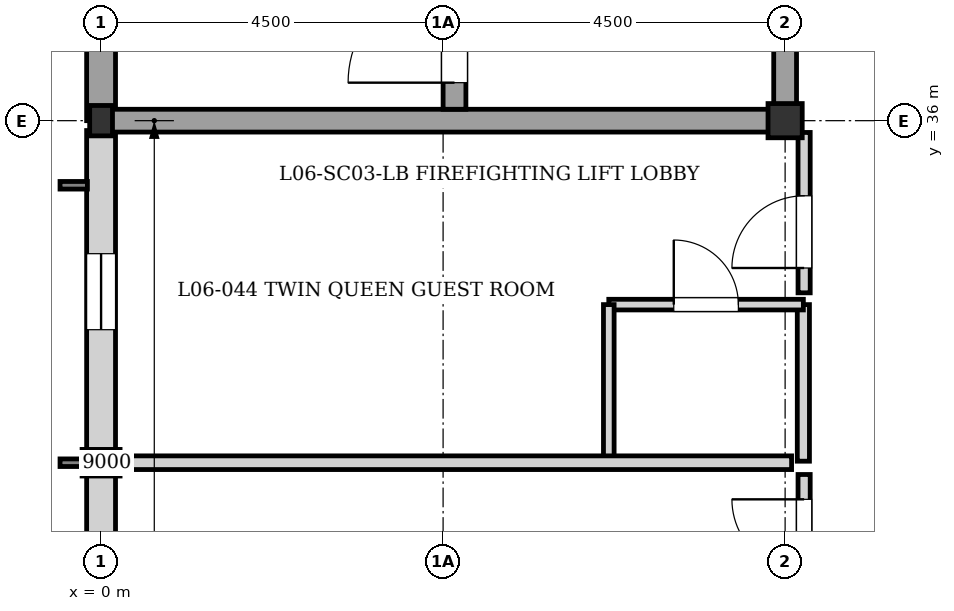
"""IFC4 building model, lengths in metres.
Left out: names, types, materials, properties, quantities, classifications, styles, units other than length and angle.
Written with IfcOpenShell. Run it as: python <this file> out.ifc"""

import sys

from ifc_helpers import new_model, si_unit, direction, frame, frame_2d, origin, origin_2d, place, context, subcontext, project, spatial, rectangle, i_section, extrude, element, fill, save


model = new_model("IFC4")
c1 = context("Model", 3, precision=1e-05, world=origin(), true_north=direction((0.0, 1.0)))
c2 = subcontext(c1, "Body", "Model", "MODEL_VIEW")
j1 = project(units=[si_unit("LENGTHUNIT", "METRE"), si_unit("PLANEANGLEUNIT", "RADIAN")], contexts=[c1])
p1 = place(None, origin())
s1 = spatial("IfcSite", under=j1, at=p1, CompositionType="ELEMENT")
p2 = place(p1, origin())
s2 = spatial("IfcBuilding", under=s1, at=p2, CompositionType="ELEMENT")
p3 = place(p2, frame((0.0, 0.0, 20.64)))
s3 = spatial("IfcBuildingStorey", under=s2, at=p3, CompositionType="ELEMENT", Elevation=20.64)
p4 = place(p3, frame((0.0, 36.0, 0.0), z_axis=(0.0, 0.0, 1.0), x_axis=(1.0, 0.0, 0.0)))
e1 = element("IfcColumn", 1, at=p4, inside=s3, PredefinedType="COLUMN", context=c2, shape_type="SweptSolid", body=[
    extrude(i_section(OverallWidth=0.3, OverallDepth=0.4, WebThickness=0.013, FlangeThickness=0.024, at=origin_2d()), origin(), (0.0, 0.0, 1.0), 3.04),
])
p5 = place(p3, frame((9.0, 36.0, 0.0), z_axis=(0.0, 0.0, 1.0), x_axis=(1.0, 0.0, 0.0)))
e2 = element("IfcColumn", 2, at=p5, inside=s3, PredefinedType="COLUMN", context=c2, shape_type="SweptSolid", body=[
    extrude(rectangle(XDim=0.45, YDim=0.45, at=origin_2d()), origin(), (0.0, 0.0, 1.0), 3.04),
])
p6 = place(p3, frame((0.0, 31.5, 0.0), z_axis=(0.0, 0.0, 1.0), x_axis=(0.0, 1.0, 0.0)))
e3 = element("IfcColumn", 3, at=p6, inside=s3, PredefinedType="PILASTER", context=c2, shape_type="SweptSolid", body=[
    extrude(rectangle(XDim=0.35, YDim=0.5, at=origin_2d()), origin(), (0.0, 0.0, 1.0), 3.04),
])
p7 = place(p3, frame((0.0, 27.0, 0.0), z_axis=(0.0, 0.0, 1.0), x_axis=(0.0, 1.0, 0.0)))
e4 = element("IfcWall", 4, at=p7, inside=s3, PredefinedType="SOLIDWALL", context=c2, shape_type="SweptSolid", body=[
    extrude(rectangle(XDim=8.87, YDim=0.38, at=frame_2d((4.435, 0.0))), origin(), (0.0, 0.0, 1.0), 2.82),
])
p8 = place(p7, frame((1.75, 0.0, 0.35)))
e5 = element("IfcOpeningElement", 5, at=p8, cuts=e4, PredefinedType="OPENING", context=c2, shape_type="SweptSolid", body=[
    extrude(rectangle(XDim=1.0, YDim=1.6, at=frame_2d((0.5, 0.8))), frame((0.0, 0.2, 0.0), z_axis=(0.0, -1.0, 0.0), x_axis=(1.0, 0.0, 0.0)), (0.0, 0.0, 1.0), 0.4),
])
p9 = place(p7, frame((6.25, 0.0, 0.35)))
e6 = element("IfcOpeningElement", 6, at=p9, cuts=e4, PredefinedType="OPENING", context=c2, shape_type="SweptSolid", body=[
    extrude(rectangle(XDim=1.0, YDim=1.6, at=frame_2d((0.5, 0.8))), frame((0.0, 0.2, 0.0), z_axis=(0.0, -1.0, 0.0), x_axis=(1.0, 0.0, 0.0)), (0.0, 0.0, 1.0), 0.4),
])
p10 = place(p3, frame((0.0, 36.0, 0.0), z_axis=(0.0, 0.0, 1.0), x_axis=(0.0, 1.0, 0.0)))
e7 = element("IfcWall", 7, at=p10, inside=s3, PredefinedType="SOLIDWALL", context=c2, shape_type="SweptSolid", body=[
    extrude(rectangle(XDim=9.0, YDim=0.38, at=frame_2d((4.5, 0.0))), origin(), (0.0, 0.0, 1.0), 2.82),
])
p11 = place(p3, frame((0.0, 36.0, 0.0), z_axis=(0.0, 0.0, 1.0), x_axis=(1.0, 0.0, 0.0)))
e8 = element("IfcWall", 8, at=p11, inside=s3, PredefinedType="SHEAR", context=c2, shape_type="SweptSolid", body=[
    extrude(rectangle(XDim=9.0, YDim=0.3, at=frame_2d((4.5, 0.0))), origin(), (0.0, 0.0, 1.0), 2.82),
])
p12 = place(p3, frame((9.0, 36.0, 0.0), z_axis=(0.0, 0.0, 1.0), x_axis=(0.0, 1.0, 0.0)))
e9 = element("IfcWall", 9, at=p12, inside=s3, PredefinedType="SHEAR", context=c2, shape_type="SweptSolid", body=[
    extrude(rectangle(XDim=9.0, YDim=0.3, at=frame_2d((4.5, 0.0))), origin(), (0.0, 0.0, 1.0), 2.82),
])
p13 = place(p12, frame((2.05, 0.0, 0.0)))
e10 = element("IfcOpeningElement", 10, at=p13, cuts=e9, PredefinedType="OPENING", context=c2, shape_type="SweptSolid", body=[
    extrude(rectangle(XDim=1.4, YDim=2.02, at=frame_2d((0.7, 1.01))), frame((0.0, 0.16, 0.0), z_axis=(0.0, -1.0, 0.0), x_axis=(1.0, 0.0, 0.0)), (0.0, 0.0, 1.0), 0.32),
])
p14 = place(p3, frame((4.65, 36.15, 0.0), z_axis=(0.0, 0.0, 1.0), x_axis=(0.0, 1.0, 0.0)))
e11 = element("IfcWall", 11, at=p14, inside=s3, PredefinedType="SHEAR", context=c2, shape_type="SweptSolid", body=[
    extrude(rectangle(XDim=8.7, YDim=0.3, at=frame_2d((4.35, 0.0))), origin(), (0.0, 0.0, 1.0), 2.82),
])
p15 = place(p14, frame((0.35, 0.0, 0.0)))
e12 = element("IfcOpeningElement", 12, at=p15, cuts=e11, PredefinedType="OPENING", context=c2, shape_type="SweptSolid", body=[
    extrude(rectangle(XDim=1.4, YDim=2.02, at=frame_2d((0.7, 1.01))), frame((0.0, 0.16, 0.0), z_axis=(0.0, -1.0, 0.0), x_axis=(1.0, 0.0, 0.0)), (0.0, 0.0, 1.0), 0.32),
])
p16 = place(p3, frame((9.24, 31.52, 0.0), z_axis=(0.0, 0.0, 1.0), x_axis=(0.0, 1.0, 0.0)))
e13 = element("IfcWall", 13, at=p16, inside=s3, PredefinedType="PARTITIONING", context=c2, shape_type="SweptSolid", body=[
    extrude(rectangle(XDim=2.06, YDim=0.16, at=frame_2d((1.03, 0.0))), origin(), (0.0, 0.0, 1.0), 2.82),
])
p17 = place(p3, frame((6.68, 33.58, 0.0), z_axis=(0.0, 0.0, 1.0), x_axis=(1.0, 0.0, 0.0)))
e14 = element("IfcWall", 14, at=p17, inside=s3, PredefinedType="PLUMBINGWALL", context=c2, shape_type="SweptSolid", body=[
    extrude(rectangle(XDim=2.56, YDim=0.14, at=frame_2d((1.28, 0.0))), origin(), (0.0, 0.0, 1.0), 2.82),
])
p18 = place(p17, frame((0.855, 0.0, 0.0)))
e15 = element("IfcOpeningElement", 15, at=p18, cuts=e14, PredefinedType="OPENING", context=c2, shape_type="SweptSolid", body=[
    extrude(rectangle(XDim=0.85, YDim=2.04, at=frame_2d((0.425, 1.02))), frame((0.0, 0.08, 0.0), z_axis=(0.0, -1.0, 0.0), x_axis=(1.0, 0.0, 0.0)), (0.0, 0.0, 1.0), 0.16),
])
p19 = place(p3, frame((6.68, 31.52, 0.0), z_axis=(0.0, 0.0, 1.0), x_axis=(0.0, 1.0, 0.0)))
e16 = element("IfcWall", 16, at=p19, inside=s3, PredefinedType="PLUMBINGWALL", context=c2, shape_type="SweptSolid", body=[
    extrude(rectangle(XDim=2.06, YDim=0.14, at=frame_2d((1.03, 0.0))), origin(), (0.0, 0.0, 1.0), 2.82),
])
p20 = place(p3, frame((0.195, 31.5, 0.0), z_axis=(0.0, 0.0, 1.0), x_axis=(1.0, 0.0, 0.0)))
e17 = element("IfcWall", 17, at=p20, inside=s3, PredefinedType="PARTITIONING", context=c2, shape_type="SweptSolid", body=[
    extrude(rectangle(XDim=8.89, YDim=0.18, at=frame_2d((4.445, 0.0))), origin(), (0.0, 0.0, 1.0), 2.82),
])
p21 = place(p3, frame((9.25, 29.235, 0.0), z_axis=(0.0, 0.0, 1.0), x_axis=(0.0, 1.0, 0.0)))
e18 = element("IfcWall", 18, at=p21, inside=s3, PredefinedType="PARTITIONING", context=c2, shape_type="SweptSolid", body=[
    extrude(rectangle(XDim=2.11, YDim=0.16, at=frame_2d((1.055, 0.0))), origin(), (0.0, 0.0, 1.0), 2.82),
])
p22 = place(p21, frame((0.833, 0.0, 0.0)))
e19 = element("IfcOpeningElement", 19, at=p22, cuts=e18, PredefinedType="OPENING", context=c2, shape_type="SweptSolid", body=[
    extrude(rectangle(XDim=0.95, YDim=2.15, at=frame_2d((0.475, 1.075))), frame((0.0, 0.09, 0.0), z_axis=(0.0, -1.0, 0.0), x_axis=(1.0, 0.0, 0.0)), (0.0, 0.0, 1.0), 0.18),
])
p23 = place(p3, frame((9.25, 33.735, 0.0), z_axis=(0.0, 0.0, 1.0), x_axis=(0.0, 1.0, 0.0)))
e20 = element("IfcWall", 20, at=p23, inside=s3, PredefinedType="PARTITIONING", context=c2, shape_type="SweptSolid", body=[
    extrude(rectangle(XDim=2.11, YDim=0.16, at=frame_2d((1.055, 0.0))), origin(), (0.0, 0.0, 1.0), 2.82),
])
p24 = place(p23, frame((0.327, 0.0, 0.0)))
e21 = element("IfcOpeningElement", 21, at=p24, cuts=e20, PredefinedType="OPENING", context=c2, shape_type="SweptSolid", body=[
    extrude(rectangle(XDim=0.95, YDim=2.15, at=frame_2d((0.475, 1.075))), frame((0.0, 0.09, 0.0), z_axis=(0.0, -1.0, 0.0), x_axis=(1.0, 0.0, 0.0)), (0.0, 0.0, 1.0), 0.18),
])
p25 = place(p9, origin())
e22 = element("IfcWindow", 22, at=p25, inside=s3, PartitioningType="SINGLE_PANEL", PredefinedType="WINDOW", context=c2, shape_type="SweptSolid", body=[
    extrude(rectangle(XDim=1.0, YDim=1.6, at=frame_2d((0.5, 0.8))), frame((0.0, 0.03, 0.0), z_axis=(0.0, -1.0, 0.0), x_axis=(1.0, 0.0, 0.0)), (0.0, 0.0, 1.0), 0.06),
])
fill(e6, e22)
p26 = place(p15, origin())
e23 = element("IfcDoor", 23, at=p26, inside=s3, OperationType="SINGLE_SWING_LEFT", PredefinedType="DOOR", context=c2, shape_type="SweptSolid", body=[
    extrude(rectangle(XDim=1.4, YDim=2.02, at=frame_2d((0.7, 1.01))), frame((0.0, 0.025, 0.0), z_axis=(0.0, -1.0, 0.0), x_axis=(1.0, 0.0, 0.0)), (0.0, 0.0, 1.0), 0.05),
])
fill(e12, e23)
p27 = place(p18, origin())
e24 = element("IfcDoor", 24, at=p27, inside=s3, OperationType="SINGLE_SWING_LEFT", PredefinedType="DOOR", context=c2, shape_type="SweptSolid", body=[
    extrude(rectangle(XDim=0.85, YDim=2.04, at=frame_2d((0.425, 1.02))), frame((0.0, 0.025, 0.0), z_axis=(0.0, -1.0, 0.0), x_axis=(1.0, 0.0, 0.0)), (0.0, 0.0, 1.0), 0.05),
])
fill(e15, e24)
p28 = place(p22, origin())
e25 = element("IfcDoor", 25, at=p28, inside=s3, OperationType="SINGLE_SWING_RIGHT", PredefinedType="DOOR", context=c2, shape_type="SweptSolid", body=[
    extrude(rectangle(XDim=0.95, YDim=2.15, at=frame_2d((0.475, 1.075))), frame((0.0, 0.025, 0.0), z_axis=(0.0, -1.0, 0.0), x_axis=(1.0, 0.0, 0.0)), (0.0, 0.0, 1.0), 0.05),
])
fill(e19, e25)
p29 = place(p24, origin())
e26 = element("IfcDoor", 26, at=p29, inside=s3, OperationType="SINGLE_SWING_LEFT", PredefinedType="DOOR", context=c2, shape_type="SweptSolid", body=[
    extrude(rectangle(XDim=0.95, YDim=2.15, at=frame_2d((0.475, 1.075))), frame((0.0, 0.025, 0.0), z_axis=(0.0, -1.0, 0.0), x_axis=(1.0, 0.0, 0.0)), (0.0, 0.0, 1.0), 0.05),
])
fill(e21, e26)
save(model, sys.argv[1])
